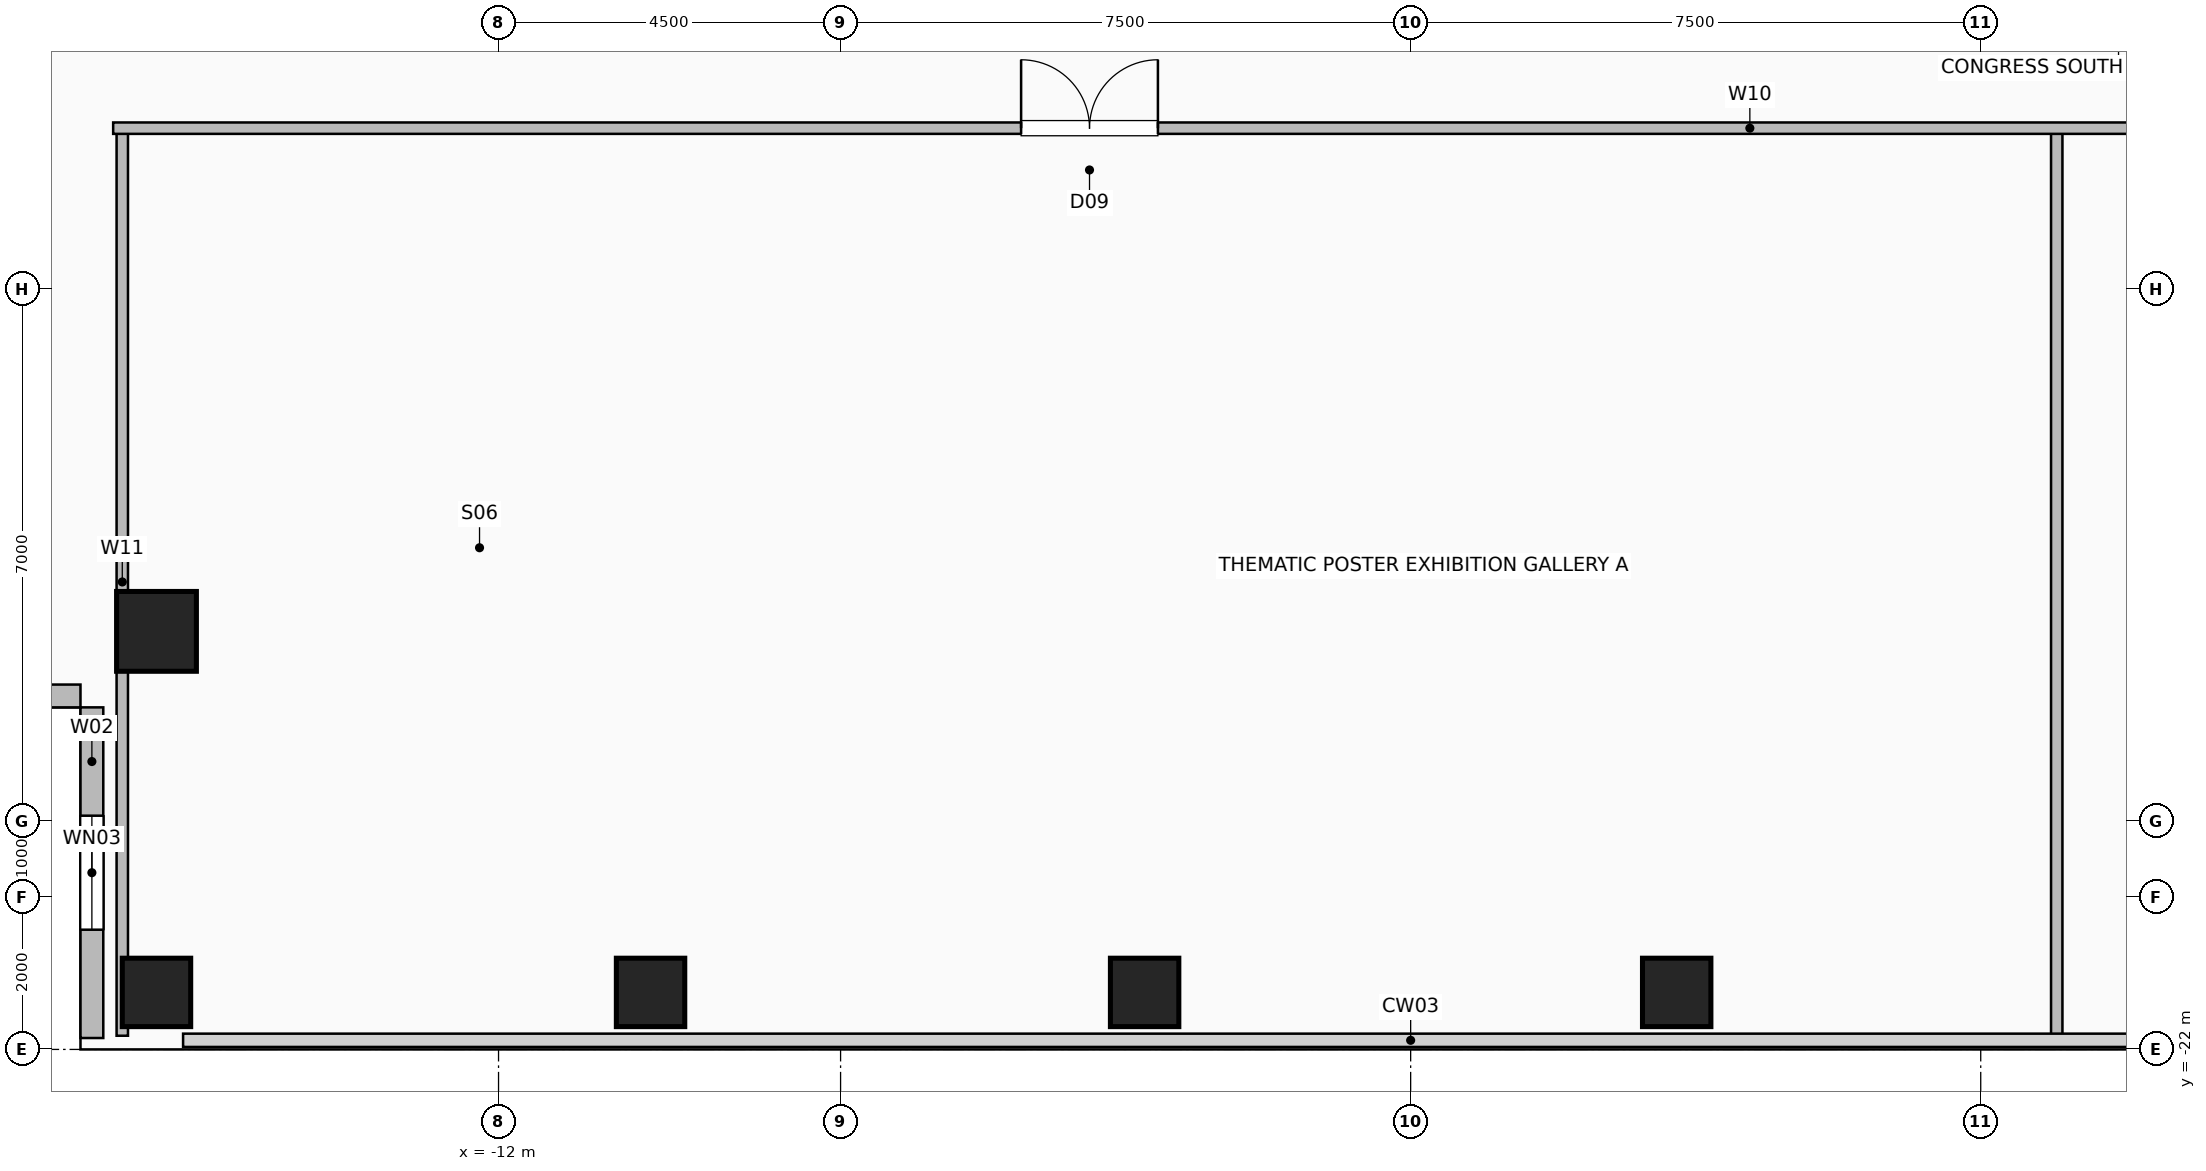
"""IFC4 building model, lengths in metres.
Left out: names, types, materials, properties, quantities, classifications, styles, units other than length and angle.
Written with IfcOpenShell. Run it as: python <this file> out.ifc"""

import sys

from ifc_helpers import new_model, si_unit, direction, frame, frame_2d, origin, origin_2d, place, context, subcontext, project, spatial, rectangle, hollow_rectangle, extrude, element, fill, save


model = new_model("IFC4")
c1 = context("Model", 3, precision=1e-05, world=origin(), true_north=direction((0.0, 1.0)))
c2 = subcontext(c1, "Body", "Model", "MODEL_VIEW")
j1 = project(units=[si_unit("LENGTHUNIT", "METRE"), si_unit("PLANEANGLEUNIT", "RADIAN")], contexts=[c1])
p1 = place(None, origin())
s1 = spatial("IfcSite", under=j1, at=p1, CompositionType="ELEMENT")
p2 = place(p1, origin())
s2 = spatial("IfcBuilding", under=s1, at=p2, CompositionType="ELEMENT")
p3 = place(p2, frame((0.0, 0.0, 140.8)))
s3 = spatial("IfcBuildingStorey", under=s2, at=p3, CompositionType="ELEMENT", Elevation=140.8)
for number, where, z_axis, x_axis in (
    (1, (-16.5, -21.25, 0.0), (0.0, 0.0, 1.0), (1.0, 0.0, 0.0)),
    (2, (-10.0, -21.25, 0.0), (0.0, 0.0, 1.0), (1.0, 0.0, 0.0)),
    (3, (-3.5, -21.25, 0.0), (0.0, 0.0, 1.0), (1.0, 0.0, 0.0)),
    (4, (3.5, -21.25, 0.0), (0.0, 0.0, 1.0), (1.0, 0.0, 0.0)),
):
    element("IfcColumn", number, at=place(p3, frame(where, z_axis=z_axis, x_axis=x_axis)), inside=s3, PredefinedType="COLUMN", context=c2, shape_type="SweptSolid", body=[
        extrude(hollow_rectangle(XDim=0.9, YDim=0.9, WallThickness=0.045, at=origin_2d()), origin(), (0.0, 0.0, 1.0), 3.6),
    ])
p4 = place(p3, frame((-16.5, -16.5, 0.0), z_axis=(0.0, 0.0, 1.0), x_axis=(1.0, 0.0, 0.0)))
e5 = element("IfcColumn", 5, at=p4, inside=s3, PredefinedType="COLUMN", context=c2, shape_type="SweptSolid", body=[
    extrude(hollow_rectangle(XDim=1.05, YDim=1.05, WallThickness=0.05, at=origin_2d()), origin(), (0.0, 0.0, 1.0), 3.6),
])
p5 = place(p3, frame((-17.35, -21.85, 0.0), z_axis=(0.0, 0.0, 1.0), x_axis=(0.0, 1.0, 0.0)))
e6 = element("IfcWall", 6, at=p5, inside=s3, PredefinedType="SOLIDWALL", context=c2, shape_type="SweptSolid", body=[
    extrude(rectangle(XDim=4.35, YDim=0.3, at=frame_2d((2.175, 0.0))), origin(), (0.0, 0.0, 1.0), 3.36),
])
p6 = place(p5, frame((1.425, 0.0, 0.9)))
e7 = element("IfcOpeningElement", 7, at=p6, cuts=e6, PredefinedType="OPENING", context=c2, shape_type="SweptSolid", body=[
    extrude(rectangle(XDim=1.5, YDim=1.8, at=frame_2d((0.75, 0.9))), frame((0.0, 0.16, 0.0), z_axis=(0.0, -1.0, 0.0), x_axis=(1.0, 0.0, 0.0)), (0.0, 0.0, 1.0), 0.32),
])
p7 = place(p3, frame((-21.85, -17.35, 0.0), z_axis=(0.0, 0.0, 1.0), x_axis=(1.0, 0.0, 0.0)))
e8 = element("IfcWall", 8, at=p7, inside=s3, PredefinedType="SOLIDWALL", context=c2, shape_type="SweptSolid", body=[
    extrude(rectangle(XDim=4.35, YDim=0.3, at=frame_2d((2.175, 0.0))), origin(), (0.0, 0.0, 1.0), 3.36),
])
for number, where, z_axis, x_axis in (
    (9, (-16.95, -21.82, 0.0), (0.0, 0.0, 1.0), (0.0, 1.0, 0.0)),
    (10, (8.5, -21.82, 0.0), (0.0, 0.0, 1.0), (0.0, 1.0, 0.0)),
):
    element("IfcWall", number, at=place(p3, frame(where, z_axis=z_axis, x_axis=x_axis)), inside=s3, PredefinedType="PARTITIONING", context=c2, shape_type="SweptSolid", body=[
        extrude(rectangle(XDim=11.94, YDim=0.15, at=frame_2d((5.97, 0.0))), origin(), (0.0, 0.0, 1.0), 3.36),
    ])
p8 = place(p3, frame((-17.07, -9.88, 0.0), z_axis=(0.0, 0.0, 1.0), x_axis=(1.0, 0.0, 0.0)))
e11 = element("IfcWall", 11, at=p8, inside=s3, PredefinedType="PARTITIONING", context=c2, shape_type="SweptSolid", body=[
    extrude(rectangle(XDim=34.14, YDim=0.15, at=frame_2d((17.07, 0.0))), origin(), (0.0, 0.0, 1.0), 3.36),
])
p9 = place(p8, frame((11.945, 0.0, 0.0)))
e12 = element("IfcOpeningElement", 12, at=p9, cuts=e11, PredefinedType="OPENING", context=c2, shape_type="SweptSolid", body=[
    extrude(rectangle(XDim=1.8, YDim=2.08, at=frame_2d((0.9, 1.04))), frame((0.0, 0.085, 0.0), z_axis=(0.0, -1.0, 0.0), x_axis=(1.0, 0.0, 0.0)), (0.0, 0.0, 1.0), 0.17),
])
p10 = place(p8, frame((29.32, 0.0, 0.0)))
e13 = element("IfcOpeningElement", 13, at=p10, cuts=e11, PredefinedType="OPENING", context=c2, shape_type="SweptSolid", body=[
    extrude(rectangle(XDim=0.95, YDim=2.06, at=frame_2d((0.475, 1.03))), frame((0.0, 0.085, 0.0), z_axis=(0.0, -1.0, 0.0), x_axis=(1.0, 0.0, 0.0)), (0.0, 0.0, 1.0), 0.17),
])
p11 = place(p6, origin())
e14 = element("IfcWindow", 14, at=p11, inside=s3, PartitioningType="SINGLE_PANEL", PredefinedType="WINDOW", context=c2, shape_type="SweptSolid", body=[
    extrude(rectangle(XDim=1.5, YDim=1.8, at=frame_2d((0.75, 0.9))), frame((0.0, 0.03, 0.0), z_axis=(0.0, -1.0, 0.0), x_axis=(1.0, 0.0, 0.0)), (0.0, 0.0, 1.0), 0.06),
])
fill(e7, e14)
p12 = place(p9, origin())
e15 = element("IfcDoor", 15, at=p12, inside=s3, OperationType="DOUBLE_DOOR_SINGLE_SWING", PredefinedType="DOOR", context=c2, shape_type="SweptSolid", body=[
    extrude(rectangle(XDim=1.8, YDim=2.08, at=frame_2d((0.9, 1.04))), frame((0.0, 0.025, 0.0), z_axis=(0.0, -1.0, 0.0), x_axis=(1.0, 0.0, 0.0)), (0.0, 0.0, 1.0), 0.05),
])
fill(e12, e15)
save(model, sys.argv[1])
